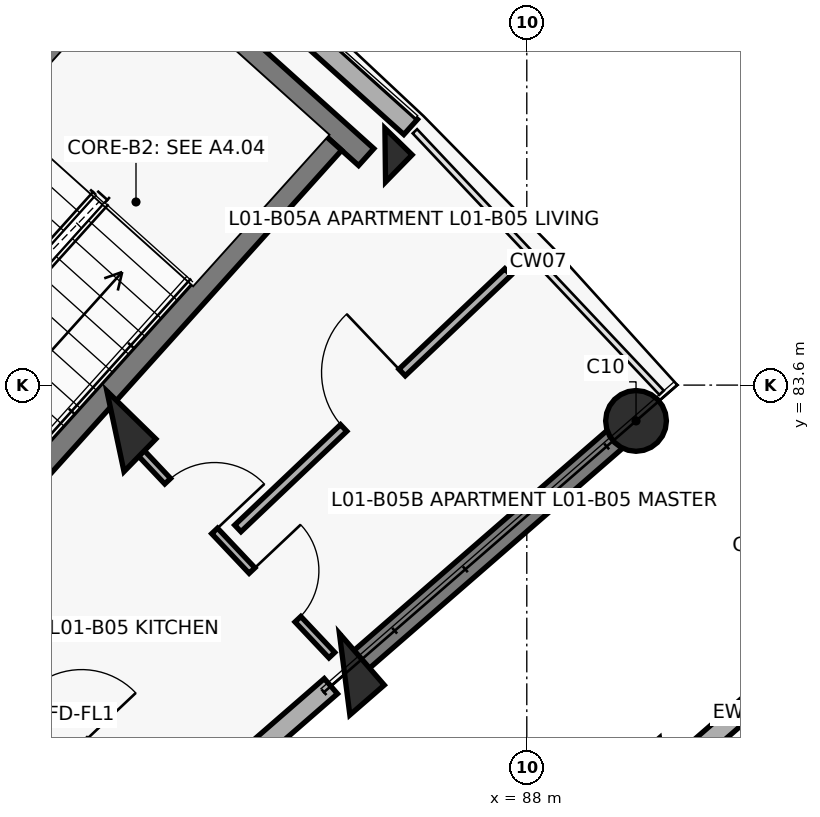
"""IFC4 building model, lengths in metres.
Left out: names, types, materials, properties, quantities, classifications, styles, units other than length and angle.
Written with IfcOpenShell. Run it as: python <this file> out.ifc"""

import sys

from ifc_helpers import new_model, si_unit, direction, frame, frame_2d, origin, origin_2d, place, context, subcontext, project, spatial, rectangle, circle, extrude, element, fill, save


model = new_model("IFC4")
c1 = context("Model", 3, precision=1e-05, world=origin(), true_north=direction((0.0, 1.0)))
c2 = subcontext(c1, "Body", "Model", "MODEL_VIEW")
j1 = project(units=[si_unit("LENGTHUNIT", "METRE"), si_unit("PLANEANGLEUNIT", "RADIAN")], contexts=[c1])
p1 = place(None, origin())
s1 = spatial("IfcSite", under=j1, at=p1, CompositionType="ELEMENT")
p2 = place(p1, origin())
s2 = spatial("IfcBuilding", under=s1, at=p2, CompositionType="ELEMENT")
p3 = place(p2, frame((0.0, 0.0, 4.5)))
s3 = spatial("IfcBuildingStorey", under=s2, at=p3, CompositionType="ELEMENT", Elevation=4.5)
p4 = place(p3, frame((82.588, 82.991, 0.0), z_axis=(0.0, 0.0, 1.0), x_axis=(0.698665066769, 0.715448897181, 0.0)))
e1 = element("IfcColumn", 1, at=p4, inside=s3, PredefinedType="COLUMN", context=c2, shape_type="SweptSolid", body=[
    extrude(rectangle(XDim=0.6, YDim=0.9, at=origin_2d()), origin(), (0.0, 0.0, 1.0), 3.6),
])
p5 = place(p3, frame((86.137, 86.626, 0.0), z_axis=(0.0, 0.0, 1.0), x_axis=(0.698665066769, 0.715448897181, 0.0)))
e2 = element("IfcColumn", 2, at=p5, inside=s3, PredefinedType="COLUMN", context=c2, shape_type="SweptSolid", body=[
    extrude(rectangle(XDim=0.5, YDim=0.5, at=origin_2d()), origin(), (0.0, 0.0, 1.0), 3.6),
])
p6 = place(p3, frame((85.603, 79.796, 0.0), z_axis=(0.0, 0.0, 1.0), x_axis=(0.754709580223, 0.656059028991, 0.0)))
e3 = element("IfcColumn", 3, at=p6, inside=s3, PredefinedType="COLUMN", context=c2, shape_type="SweptSolid", body=[
    extrude(rectangle(XDim=0.6, YDim=0.9, at=origin_2d()), origin(), (0.0, 0.0, 1.0), 3.6),
])
p7 = place(p3, frame((89.437, 83.129, 0.0), z_axis=(0.0, 0.0, 1.0), x_axis=(0.754709580223, 0.656059028991, 0.0)))
e4 = element("IfcColumn", 4, at=p7, inside=s3, PredefinedType="COLUMN", context=c2, shape_type="SweptSolid", body=[
    extrude(circle(Radius=0.4, at=origin_2d()), origin(), (0.0, 0.0, 1.0), 3.6),
])
p8 = place(p3, frame((85.739, 79.914, 0.0), z_axis=(0.0, 0.0, 1.0), x_axis=(0.754703505217, 0.65606601742, 0.0)))
e5 = element("IfcWall", 5, at=p8, inside=s3, PredefinedType="SHEAR", context=c2, shape_type="SweptSolid", body=[
    extrude(rectangle(XDim=4.72, YDim=0.31, at=frame_2d((2.36, 0.0))), origin(), (0.0, 0.0, 1.0), 3.36),
])
p9 = place(p3, frame((82.897, 90.213, 0.0), z_axis=(0.0, 0.0, 1.0), x_axis=(0.743387539862, -0.668860946369, 0.0)))
e6 = element("IfcWall", 6, at=p9, inside=s3, PredefinedType="SOLIDWALL", context=c2, shape_type="SweptSolid", body=[
    extrude(rectangle(XDim=4.809, YDim=0.268, at=frame_2d((2.405, 0.0))), origin(), (0.0, 0.0, 1.0), 2.6),
])
p10 = place(p3, frame((79.234, 74.259, 0.0), z_axis=(0.0, 0.0, 1.0), x_axis=(0.754717680958, 0.656049710044, 0.0)))
e7 = element("IfcWall", 7, at=p10, inside=s3, PredefinedType="SOLIDWALL", context=c2, shape_type="SweptSolid", body=[
    extrude(rectangle(XDim=8.2, YDim=0.265, at=frame_2d((4.1, 0.0))), origin(), (0.0, 0.0, 1.0), 2.58),
])
p11 = place(p10, frame((3.59, 0.0, 0.75)))
e8 = element("IfcOpeningElement", 8, at=p11, cuts=e7, PredefinedType="OPENING", context=c2, shape_type="SweptSolid", body=[
    extrude(rectangle(XDim=1.35, YDim=1.35, at=frame_2d((0.675, 0.675))), frame((0.0, 0.142, 0.0), z_axis=(0.0, -1.0, 0.0), x_axis=(1.0, 0.0, 0.0)), (0.0, 0.0, 1.0), 0.285),
])
p12 = place(p3, frame((91.746, 80.101, 0.0), z_axis=(0.0, 0.0, 1.0), x_axis=(-0.754704866158, -0.656064451862, 0.0)))
e9 = element("IfcWall", 9, at=p12, inside=s3, PredefinedType="SOLIDWALL", context=c2, shape_type="SweptSolid", body=[
    extrude(rectangle(XDim=8.2, YDim=0.265, at=frame_2d((4.1, 0.0))), origin(), (0.0, 0.0, 1.0), 2.58),
])
p13 = place(p12, frame((3.59, 0.0, 0.75)))
e10 = element("IfcOpeningElement", 10, at=p13, cuts=e9, PredefinedType="OPENING", context=c2, shape_type="SweptSolid", body=[
    extrude(rectangle(XDim=1.35, YDim=1.35, at=frame_2d((0.675, 0.675))), frame((0.0, 0.142, 0.0), z_axis=(0.0, -1.0, 0.0), x_axis=(1.0, 0.0, 0.0)), (0.0, 0.0, 1.0), 0.285),
])
p14 = place(p3, frame((85.887, 86.601, 0.0), z_axis=(0.0, 0.0, 1.0), x_axis=(-0.743400052815, 0.668847038922, 0.0)))
e11 = element("IfcWall", 11, at=p14, inside=s3, PredefinedType="SHEAR", context=c2, shape_type="SweptSolid", body=[
    extrude(rectangle(XDim=4.47, YDim=0.3, at=frame_2d((2.235, 0.0))), origin(), (0.0, 0.0, 1.0), 3.6),
])
p15 = place(p3, frame((80.309, 81.073, 0.0), z_axis=(0.0, 0.0, 1.0), x_axis=(0.668885797871, 0.743365179038, 0.0)))
e12 = element("IfcWall", 12, at=p15, inside=s3, PredefinedType="SHEAR", context=c2, shape_type="SweptSolid", body=[
    extrude(rectangle(XDim=7.69, YDim=0.3, at=frame_2d((3.845, 0.0))), origin(), (0.0, 0.0, 1.0), 3.6),
])
p16 = place(p3, frame((77.655, 83.461, 0.0), z_axis=(0.0, 0.0, 1.0), x_axis=(0.668868253964, 0.743380964808, 0.0)))
e13 = element("IfcWall", 13, at=p16, inside=s3, PredefinedType="SHEAR", context=c2, shape_type="SweptSolid", body=[
    extrude(rectangle(XDim=7.69, YDim=0.3, at=frame_2d((3.845, 0.0))), origin(), (0.0, 0.0, 1.0), 3.6),
])
p17 = place(p3, frame((80.628, 80.483, 0.0), z_axis=(0.0, 0.0, 1.0), x_axis=(0.686310507227, -0.727308660522, 0.0)))
e14 = element("IfcWall", 14, at=p17, inside=s3, PredefinedType="SOLIDWALL", context=c2, shape_type="SweptSolid", body=[
    extrude(rectangle(XDim=3.436, YDim=0.19, at=frame_2d((1.718, 0.0))), origin(), (0.0, 0.0, 1.0), 2.58),
])
p18 = place(p17, frame((1.228, 0.0, 0.0)))
e15 = element("IfcOpeningElement", 15, at=p18, cuts=e14, PredefinedType="OPENING", context=c2, shape_type="SweptSolid", body=[
    extrude(rectangle(XDim=0.98, YDim=2.15, at=frame_2d((0.49, 1.075))), frame((0.0, 0.105, 0.0), z_axis=(0.0, -1.0, 0.0), x_axis=(1.0, 0.0, 0.0)), (0.0, 0.0, 1.0), 0.21),
])
p19 = place(p3, frame((82.829, 82.809, 0.0), z_axis=(0.0, 0.0, 1.0), x_axis=(0.686300649561, -0.727317962388, 0.0)))
e16 = element("IfcWall", 16, at=p19, inside=s3, PredefinedType="PARTITIONING", context=c2, shape_type="SweptSolid", body=[
    extrude(rectangle(XDim=3.797, YDim=0.105, at=frame_2d((1.899, 0.0))), origin(), (0.0, 0.0, 1.0), 2.58),
])
p20 = place(p19, frame((0.65, 0.0, 0.0)))
e17 = element("IfcOpeningElement", 17, at=p20, cuts=e16, PredefinedType="OPENING", context=c2, shape_type="SweptSolid", body=[
    extrude(rectangle(XDim=0.9, YDim=2.1, at=frame_2d((0.45, 1.05))), frame((0.0, 0.062, 0.0), z_axis=(0.0, -1.0, 0.0), x_axis=(1.0, 0.0, 0.0)), (0.0, 0.0, 1.0), 0.125),
])
p21 = place(p19, frame((2.267, 0.0, 0.0)))
e18 = element("IfcOpeningElement", 18, at=p21, cuts=e16, PredefinedType="OPENING", context=c2, shape_type="SweptSolid", body=[
    extrude(rectangle(XDim=0.88, YDim=2.1, at=frame_2d((0.44, 1.05))), frame((0.0, 0.062, 0.0), z_axis=(0.0, -1.0, 0.0), x_axis=(1.0, 0.0, 0.0)), (0.0, 0.0, 1.0), 0.125),
])
p22 = place(p3, frame((84.198, 81.714, 0.0), z_axis=(0.0, 0.0, 1.0), x_axis=(0.725204659953, 0.688533369694, 0.0)))
e19 = element("IfcWall", 19, at=p22, inside=s3, PredefinedType="PARTITIONING", context=c2, shape_type="SweptSolid", body=[
    extrude(rectangle(XDim=4.9, YDim=0.12, at=frame_2d((2.45, 0.0))), origin(), (0.0, 0.0, 1.0), 2.58),
])
p23 = place(p22, frame((1.92, 0.0, 0.0)))
e20 = element("IfcOpeningElement", 20, at=p23, cuts=e19, PredefinedType="OPENING", context=c2, shape_type="SweptSolid", body=[
    extrude(rectangle(XDim=1.06, YDim=2.1, at=frame_2d((0.53, 1.05))), frame((0.0, 0.07, 0.0), z_axis=(0.0, -1.0, 0.0), x_axis=(1.0, 0.0, 0.0)), (0.0, 0.0, 1.0), 0.14),
])
p24 = place(p18, origin())
e21 = element("IfcDoor", 21, at=p24, inside=s3, OperationType="SINGLE_SWING_RIGHT", PredefinedType="DOOR", context=c2, shape_type="SweptSolid", body=[
    extrude(rectangle(XDim=0.98, YDim=2.15, at=frame_2d((0.49, 1.075))), frame((0.0, 0.025, 0.0), z_axis=(0.0, -1.0, 0.0), x_axis=(1.0, 0.0, 0.0)), (0.0, 0.0, 1.0), 0.05),
])
fill(e15, e21)
p25 = place(p20, origin())
e22 = element("IfcDoor", 22, at=p25, inside=s3, OperationType="SINGLE_SWING_RIGHT", PredefinedType="DOOR", context=c2, shape_type="SweptSolid", body=[
    extrude(rectangle(XDim=0.9, YDim=2.1, at=frame_2d((0.45, 1.05))), frame((0.0, 0.025, 0.0), z_axis=(0.0, -1.0, 0.0), x_axis=(1.0, 0.0, 0.0)), (0.0, 0.0, 1.0), 0.05),
])
fill(e17, e22)
p26 = place(p21, origin())
e23 = element("IfcDoor", 23, at=p26, inside=s3, OperationType="SINGLE_SWING_LEFT", PredefinedType="DOOR", context=c2, shape_type="SweptSolid", body=[
    extrude(rectangle(XDim=0.88, YDim=2.1, at=frame_2d((0.44, 1.05))), frame((0.0, 0.025, 0.0), z_axis=(0.0, -1.0, 0.0), x_axis=(1.0, 0.0, 0.0)), (0.0, 0.0, 1.0), 0.05),
])
fill(e18, e23)
p27 = place(p23, origin())
e24 = element("IfcDoor", 24, at=p27, inside=s3, OperationType="SINGLE_SWING_RIGHT", PredefinedType="DOOR", context=c2, shape_type="SweptSolid", body=[
    extrude(rectangle(XDim=1.06, YDim=2.1, at=frame_2d((0.53, 1.05))), frame((0.0, 0.025, 0.0), z_axis=(0.0, -1.0, 0.0), x_axis=(1.0, 0.0, 0.0)), (0.0, 0.0, 1.0), 0.05),
])
fill(e20, e24)
save(model, sys.argv[1])
